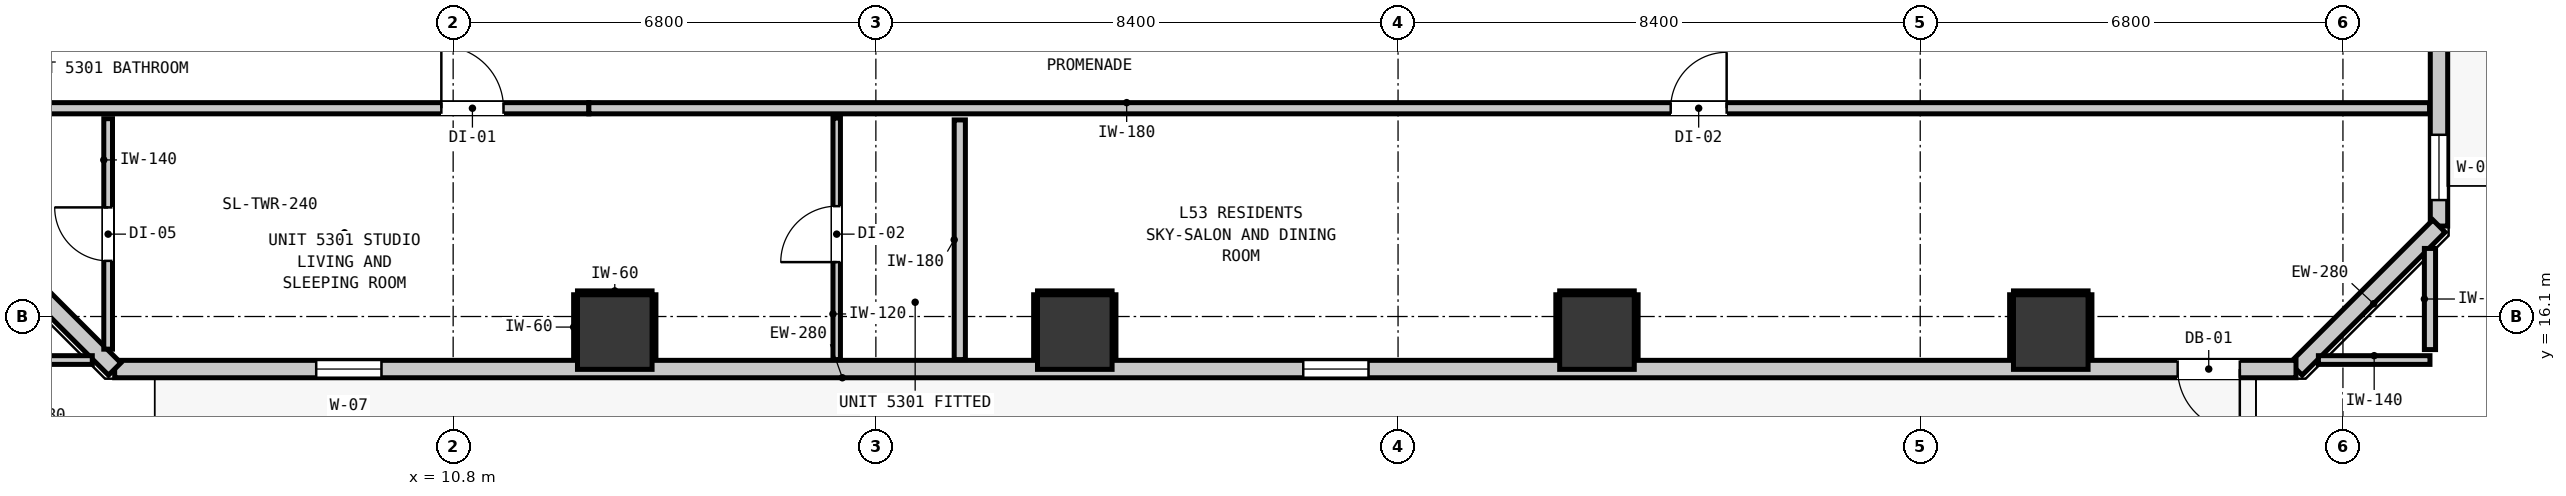
"""IFC4 building model, lengths in metres.
Left out: names, types, materials, properties, quantities, classifications, styles, units other than length and angle.
Written with IfcOpenShell. Run it as: python <this file> out.ifc"""

import sys

from ifc_helpers import new_model, si_unit, direction, frame, frame_2d, origin, origin_2d, place, context, subcontext, project, spatial, rectangle, extrude, element, fill, save


model = new_model("IFC4")
c1 = context("Model", 3, precision=1e-05, world=origin(), true_north=direction((0.0, 1.0)))
c2 = subcontext(c1, "Body", "Model", "MODEL_VIEW")
j1 = project(units=[si_unit("LENGTHUNIT", "METRE"), si_unit("PLANEANGLEUNIT", "RADIAN")], contexts=[c1])
p1 = place(None, origin())
s1 = spatial("IfcSite", under=j1, at=p1, CompositionType="ELEMENT")
p2 = place(p1, origin())
s2 = spatial("IfcBuilding", under=s1, at=p2, CompositionType="ELEMENT")
p3 = place(p2, frame((0.0, 0.0, 183.52)))
s3 = spatial("IfcBuildingStorey", under=s2, at=p3, CompositionType="ELEMENT", Elevation=183.52)
for number, where, z_axis, x_axis in (
    (1, (13.4, 15.85, 0.0), (0.0, 0.0, 1.0), (1.0, 0.0, 0.0)),
    (2, (20.8, 15.85, 0.0), (0.0, 0.0, 1.0), (1.0, 0.0, 0.0)),
    (3, (29.2, 15.85, 0.0), (0.0, 0.0, 1.0), (1.0, 0.0, 0.0)),
    (4, (36.5, 15.85, 0.0), (0.0, 0.0, 1.0), (1.0, 0.0, 0.0)),
):
    element("IfcColumn", number, at=place(p3, frame(where, z_axis=z_axis, x_axis=x_axis)), inside=s3, PredefinedType="COLUMN", context=c2, shape_type="SweptSolid", body=[
        extrude(rectangle(XDim=1.2, YDim=1.2, at=origin_2d()), origin(), (0.0, 0.0, 1.0), 3.32),
    ])
p4 = place(p3, frame((42.745, 49.845, 0.0), z_axis=(0.0, 0.0, 1.0), x_axis=(0.0, -1.0, 0.0)))
e5 = element("IfcWall", 5, at=p4, inside=s3, PredefinedType="STANDARD", context=c2, shape_type="SweptSolid", body=[
    extrude(rectangle(XDim=32.29, YDim=0.28, at=frame_2d((16.145, 0.0))), origin(), (0.0, 0.0, 1.0), 3.08),
])
p5 = place(p4, frame((0.904, 0.0, 0.0)))
e6 = element("IfcOpeningElement", 6, at=p5, cuts=e5, PredefinedType="OPENING", context=c2, shape_type="SweptSolid", body=[
    extrude(rectangle(XDim=1.0, YDim=2.15, at=frame_2d((0.5, 1.075))), frame((0.0, 0.15, 0.0), z_axis=(0.0, -1.0, 0.0), x_axis=(1.0, 0.0, 0.0)), (0.0, 0.0, 1.0), 0.3),
])
p6 = place(p4, frame((30.822, 0.0, 0.85)))
e7 = element("IfcOpeningElement", 7, at=p6, cuts=e5, PredefinedType="OPENING", context=c2, shape_type="SweptSolid", body=[
    extrude(rectangle(XDim=1.05, YDim=1.65, at=frame_2d((0.525, 0.825))), frame((0.0, 0.15, 0.0), z_axis=(0.0, -1.0, 0.0), x_axis=(1.0, 0.0, 0.0)), (0.0, 0.0, 1.0), 0.3),
])
p7 = place(p4, frame((4.424, 0.0, 0.85)))
e8 = element("IfcOpeningElement", 8, at=p7, cuts=e5, PredefinedType="OPENING", context=c2, shape_type="SweptSolid", body=[
    extrude(rectangle(XDim=1.05, YDim=1.65, at=frame_2d((0.525, 0.825))), frame((0.0, 0.15, 0.0), z_axis=(0.0, -1.0, 0.0), x_axis=(1.0, 0.0, 0.0)), (0.0, 0.0, 1.0), 0.3),
])
p8 = place(p4, frame((24.724, 0.0, 0.85)))
e9 = element("IfcOpeningElement", 9, at=p8, cuts=e5, PredefinedType="OPENING", context=c2, shape_type="SweptSolid", body=[
    extrude(rectangle(XDim=1.05, YDim=1.65, at=frame_2d((0.525, 0.825))), frame((0.0, 0.15, 0.0), z_axis=(0.0, -1.0, 0.0), x_axis=(1.0, 0.0, 0.0)), (0.0, 0.0, 1.0), 0.3),
])
p9 = place(p3, frame((42.745, 17.555, 0.0), z_axis=(0.0, 0.0, 1.0), x_axis=(-0.707106781187, -0.707106781187, 0.0)))
e10 = element("IfcWall", 10, at=p9, inside=s3, PredefinedType="STANDARD", context=c2, shape_type="SweptSolid", body=[
    extrude(rectangle(XDim=3.253, YDim=0.28, at=frame_2d((1.626, 0.0))), origin(), (0.0, 0.0, 1.0), 3.08),
])
p10 = place(p3, frame((40.445, 15.255, 0.0), z_axis=(0.0, 0.0, 1.0), x_axis=(-1.0, 0.0, 0.0)))
e11 = element("IfcWall", 11, at=p10, inside=s3, PredefinedType="STANDARD", context=c2, shape_type="SweptSolid", body=[
    extrude(rectangle(XDim=35.09, YDim=0.28, at=frame_2d((17.545, 0.0))), origin(), (0.0, 0.0, 1.0), 3.08),
])
p11 = place(p10, frame((0.904, 0.0, 0.0)))
e12 = element("IfcOpeningElement", 12, at=p11, cuts=e11, PredefinedType="OPENING", context=c2, shape_type="SweptSolid", body=[
    extrude(rectangle(XDim=1.0, YDim=2.15, at=frame_2d((0.5, 1.075))), frame((0.0, 0.15, 0.0), z_axis=(0.0, -1.0, 0.0), x_axis=(1.0, 0.0, 0.0)), (0.0, 0.0, 1.0), 0.3),
])
p12 = place(p10, frame((30.798, 0.0, 0.85)))
e13 = element("IfcOpeningElement", 13, at=p12, cuts=e11, PredefinedType="OPENING", context=c2, shape_type="SweptSolid", body=[
    extrude(rectangle(XDim=1.05, YDim=1.65, at=frame_2d((0.525, 0.825))), frame((0.0, 0.15, 0.0), z_axis=(0.0, -1.0, 0.0), x_axis=(1.0, 0.0, 0.0)), (0.0, 0.0, 1.0), 0.3),
])
p13 = place(p10, frame((14.92, 0.0, 0.85)))
e14 = element("IfcOpeningElement", 14, at=p13, cuts=e11, PredefinedType="OPENING", context=c2, shape_type="SweptSolid", body=[
    extrude(rectangle(XDim=1.05, YDim=1.65, at=frame_2d((0.525, 0.825))), frame((0.0, 0.15, 0.0), z_axis=(0.0, -1.0, 0.0), x_axis=(1.0, 0.0, 0.0)), (0.0, 0.0, 1.0), 0.3),
])
p14 = place(p3, frame((5.355, 15.255, 0.0), z_axis=(0.0, 0.0, 1.0), x_axis=(-0.707106781187, 0.707106781187, 0.0)))
e15 = element("IfcWall", 15, at=p14, inside=s3, PredefinedType="STANDARD", context=c2, shape_type="SweptSolid", body=[
    extrude(rectangle(XDim=3.253, YDim=0.28, at=frame_2d((1.626, 0.0))), origin(), (0.0, 0.0, 1.0), 3.08),
])
p15 = place(p3, frame((4.067, 19.45, 0.0), z_axis=(0.0, 0.0, 1.0), x_axis=(1.0, 0.0, 0.0)))
e16 = element("IfcWall", 16, at=p15, inside=s3, PredefinedType="PARTITIONING", context=c2, shape_type="SweptSolid", body=[
    extrude(rectangle(XDim=8.916, YDim=0.18, at=frame_2d((4.458, 0.0))), origin(), (0.0, 0.0, 1.0), 2.565),
])
p16 = place(p15, frame((6.543, 0.0, 0.0)))
e17 = element("IfcOpeningElement", 17, at=p16, cuts=e16, PredefinedType="OPENING", context=c2, shape_type="SweptSolid", body=[
    extrude(rectangle(XDim=1.0, YDim=2.15, at=frame_2d((0.5, 1.075))), frame((0.0, 0.1, 0.0), z_axis=(0.0, -1.0, 0.0), x_axis=(1.0, 0.0, 0.0)), (0.0, 0.0, 1.0), 0.2),
])
p17 = place(p3, frame((12.983, 19.45, 0.0), z_axis=(0.0, 0.0, 1.0), x_axis=(1.0, 0.0, 0.0)))
e18 = element("IfcWall", 18, at=p17, inside=s3, PredefinedType="PARTITIONING", context=c2, shape_type="SweptSolid", body=[
    extrude(rectangle(XDim=29.61, YDim=0.18, at=frame_2d((14.805, 0.0))), origin(), (0.0, 0.0, 1.0), 3.08),
])
p18 = place(p17, frame((17.403, 0.0, 0.0)))
e19 = element("IfcOpeningElement", 19, at=p18, cuts=e18, PredefinedType="OPENING", context=c2, shape_type="SweptSolid", body=[
    extrude(rectangle(XDim=0.9, YDim=2.1, at=frame_2d((0.45, 1.05))), frame((0.0, 0.1, 0.0), z_axis=(0.0, -1.0, 0.0), x_axis=(1.0, 0.0, 0.0)), (0.0, 0.0, 1.0), 0.2),
])
for number, where, z_axis, x_axis in (
    (20, (3.2, 15.4, 0.0), (0.0, 0.0, 1.0), (1.0, 0.0, 0.0)),
    (21, (40.805, 15.4, 0.0), (0.0, 0.0, 1.0), (1.0, 0.0, 0.0)),
):
    element("IfcWall", number, at=place(p3, frame(where, z_axis=z_axis, x_axis=x_axis)), inside=s3, PredefinedType="PARTITIONING", context=c2, shape_type="SweptSolid", body=[
        extrude(rectangle(XDim=1.795, YDim=0.14, at=frame_2d((0.897, 0.0))), origin(), (0.0, 0.0, 1.0), 3.08),
    ])
p19 = place(p3, frame((18.95, 15.407, 0.0), z_axis=(0.0, 0.0, 1.0), x_axis=(0.0, 1.0, 0.0)))
e22 = element("IfcWall", 22, at=p19, inside=s3, PredefinedType="PARTITIONING", context=c2, shape_type="SweptSolid", body=[
    extrude(rectangle(XDim=3.855, YDim=0.18, at=frame_2d((1.927, 0.0))), origin(), (0.0, 0.0, 1.0), 3.08),
])
p20 = place(p3, frame((42.6, 15.568, 0.0), z_axis=(0.0, 0.0, 1.0), x_axis=(0.0, 1.0, 0.0)))
e23 = element("IfcWall", 23, at=p20, inside=s3, PredefinedType="PARTITIONING", context=c2, shape_type="SweptSolid", body=[
    extrude(rectangle(XDim=1.627, YDim=0.18, at=frame_2d((0.813, 0.0))), origin(), (0.0, 0.0, 1.0), 3.08),
])
p21 = place(p3, frame((5.25, 15.575, 0.0), z_axis=(0.0, 0.0, 1.0), x_axis=(0.0, 1.0, 0.0)))
e24 = element("IfcWall", 24, at=p21, inside=s3, PredefinedType="PARTITIONING", context=c2, shape_type="SweptSolid", body=[
    extrude(rectangle(XDim=3.707, YDim=0.14, at=frame_2d((1.854, 0.0))), origin(), (0.0, 0.0, 1.0), 3.08),
])
p22 = place(p21, frame((1.42, 0.0, 0.0)))
e25 = element("IfcOpeningElement", 25, at=p22, cuts=e24, PredefinedType="OPENING", context=c2, shape_type="SweptSolid", body=[
    extrude(rectangle(XDim=0.86, YDim=2.02, at=frame_2d((0.43, 1.01))), frame((0.0, 0.08, 0.0), z_axis=(0.0, -1.0, 0.0), x_axis=(1.0, 0.0, 0.0)), (0.0, 0.0, 1.0), 0.16),
])
p23 = place(p3, frame((16.97, 15.407, 0.0), z_axis=(0.0, 0.0, 1.0), x_axis=(0.0, 1.0, 0.0)))
e26 = element("IfcWall", 26, at=p23, inside=s3, PredefinedType="PARTITIONING", context=c2, shape_type="SweptSolid", body=[
    extrude(rectangle(XDim=3.885, YDim=0.12, at=frame_2d((1.942, 0.0))), origin(), (0.0, 0.0, 1.0), 3.08),
])
p24 = place(p23, frame((1.568, 0.0, 0.0)))
e27 = element("IfcOpeningElement", 27, at=p24, cuts=e26, PredefinedType="OPENING", context=c2, shape_type="SweptSolid", body=[
    extrude(rectangle(XDim=0.9, YDim=2.1, at=frame_2d((0.45, 1.05))), frame((0.0, 0.07, 0.0), z_axis=(0.0, -1.0, 0.0), x_axis=(1.0, 0.0, 0.0)), (0.0, 0.0, 1.0), 0.14),
])
p25 = place(p3, frame((12.8, 16.482, 0.0), z_axis=(0.0, 0.0, 1.0), x_axis=(1.0, 0.0, 0.0)))
e28 = element("IfcWall", 28, at=p25, inside=s3, PredefinedType="PARTITIONING", context=c2, shape_type="SweptSolid", body=[
    extrude(rectangle(XDim=1.2, YDim=0.06, at=frame_2d((0.6, 0.0))), origin(), (0.0, 0.0, 1.0), 1.45),
])
for number, where, z_axis, x_axis in (
    (29, (12.768, 15.41, 0.0), (0.0, 0.0, 1.0), (0.0, 1.0, 0.0)),
    (30, (14.032, 15.41, 0.0), (0.0, 0.0, 1.0), (0.0, 1.0, 0.0)),
):
    element("IfcWall", number, at=place(p3, frame(where, z_axis=z_axis, x_axis=x_axis)), inside=s3, PredefinedType="PARTITIONING", context=c2, shape_type="SweptSolid", body=[
        extrude(rectangle(XDim=1.04, YDim=0.06, at=frame_2d((0.52, 0.0))), origin(), (0.0, 0.0, 1.0), 1.45),
    ])
p26 = place(p3, frame((20.2, 16.482, 0.0), z_axis=(0.0, 0.0, 1.0), x_axis=(1.0, 0.0, 0.0)))
e31 = element("IfcWall", 31, at=p26, inside=s3, PredefinedType="PARTITIONING", context=c2, shape_type="SweptSolid", body=[
    extrude(rectangle(XDim=1.2, YDim=0.06, at=frame_2d((0.6, 0.0))), origin(), (0.0, 0.0, 1.0), 1.45),
])
for number, where, z_axis, x_axis in (
    (32, (20.168, 15.41, 0.0), (0.0, 0.0, 1.0), (0.0, 1.0, 0.0)),
    (33, (21.432, 15.41, 0.0), (0.0, 0.0, 1.0), (0.0, 1.0, 0.0)),
):
    element("IfcWall", number, at=place(p3, frame(where, z_axis=z_axis, x_axis=x_axis)), inside=s3, PredefinedType="PARTITIONING", context=c2, shape_type="SweptSolid", body=[
        extrude(rectangle(XDim=1.04, YDim=0.06, at=frame_2d((0.52, 0.0))), origin(), (0.0, 0.0, 1.0), 1.45),
    ])
p27 = place(p3, frame((28.6, 16.482, 0.0), z_axis=(0.0, 0.0, 1.0), x_axis=(1.0, 0.0, 0.0)))
e34 = element("IfcWall", 34, at=p27, inside=s3, PredefinedType="PARTITIONING", context=c2, shape_type="SweptSolid", body=[
    extrude(rectangle(XDim=1.2, YDim=0.06, at=frame_2d((0.6, 0.0))), origin(), (0.0, 0.0, 1.0), 1.45),
])
for number, where, z_axis, x_axis in (
    (35, (28.568, 15.41, 0.0), (0.0, 0.0, 1.0), (0.0, 1.0, 0.0)),
    (36, (29.832, 15.41, 0.0), (0.0, 0.0, 1.0), (0.0, 1.0, 0.0)),
):
    element("IfcWall", number, at=place(p3, frame(where, z_axis=z_axis, x_axis=x_axis)), inside=s3, PredefinedType="PARTITIONING", context=c2, shape_type="SweptSolid", body=[
        extrude(rectangle(XDim=1.04, YDim=0.06, at=frame_2d((0.52, 0.0))), origin(), (0.0, 0.0, 1.0), 1.45),
    ])
p28 = place(p3, frame((35.9, 16.482, 0.0), z_axis=(0.0, 0.0, 1.0), x_axis=(1.0, 0.0, 0.0)))
e37 = element("IfcWall", 37, at=p28, inside=s3, PredefinedType="PARTITIONING", context=c2, shape_type="SweptSolid", body=[
    extrude(rectangle(XDim=1.2, YDim=0.06, at=frame_2d((0.6, 0.0))), origin(), (0.0, 0.0, 1.0), 1.45),
])
for number, where, z_axis, x_axis in (
    (38, (35.868, 15.41, 0.0), (0.0, 0.0, 1.0), (0.0, 1.0, 0.0)),
    (39, (37.132, 15.41, 0.0), (0.0, 0.0, 1.0), (0.0, 1.0, 0.0)),
):
    element("IfcWall", number, at=place(p3, frame(where, z_axis=z_axis, x_axis=x_axis)), inside=s3, PredefinedType="PARTITIONING", context=c2, shape_type="SweptSolid", body=[
        extrude(rectangle(XDim=1.04, YDim=0.06, at=frame_2d((0.52, 0.0))), origin(), (0.0, 0.0, 1.0), 1.45),
    ])
p29 = place(p11, origin())
e40 = element("IfcDoor", 40, at=p29, inside=s3, OperationType="SINGLE_SWING_LEFT", PredefinedType="DOOR", context=c2, shape_type="SweptSolid", body=[
    extrude(rectangle(XDim=1.0, YDim=2.15, at=frame_2d((0.5, 1.075))), frame((0.0, 0.025, 0.0), z_axis=(0.0, -1.0, 0.0), x_axis=(1.0, 0.0, 0.0)), (0.0, 0.0, 1.0), 0.05),
])
fill(e12, e40)
p30 = place(p6, origin())
e41 = element("IfcWindow", 41, at=p30, inside=s3, PartitioningType="SINGLE_PANEL", PredefinedType="WINDOW", context=c2, shape_type="SweptSolid", body=[
    extrude(rectangle(XDim=1.05, YDim=1.65, at=frame_2d((0.525, 0.825))), frame((0.0, 0.03, 0.0), z_axis=(0.0, -1.0, 0.0), x_axis=(1.0, 0.0, 0.0)), (0.0, 0.0, 1.0), 0.06),
])
fill(e7, e41)
p31 = place(p12, origin())
e42 = element("IfcWindow", 42, at=p31, inside=s3, PartitioningType="SINGLE_PANEL", PredefinedType="WINDOW", context=c2, shape_type="SweptSolid", body=[
    extrude(rectangle(XDim=1.05, YDim=1.65, at=frame_2d((0.525, 0.825))), frame((0.0, 0.03, 0.0), z_axis=(0.0, -1.0, 0.0), x_axis=(1.0, 0.0, 0.0)), (0.0, 0.0, 1.0), 0.06),
])
fill(e13, e42)
p32 = place(p13, origin())
e43 = element("IfcWindow", 43, at=p32, inside=s3, PartitioningType="SINGLE_PANEL", PredefinedType="WINDOW", context=c2, shape_type="SweptSolid", body=[
    extrude(rectangle(XDim=1.05, YDim=1.65, at=frame_2d((0.525, 0.825))), frame((0.0, 0.03, 0.0), z_axis=(0.0, -1.0, 0.0), x_axis=(1.0, 0.0, 0.0)), (0.0, 0.0, 1.0), 0.06),
])
fill(e14, e43)
p33 = place(p16, origin())
e44 = element("IfcDoor", 44, at=p33, inside=s3, OperationType="SINGLE_SWING_LEFT", PredefinedType="DOOR", context=c2, shape_type="SweptSolid", body=[
    extrude(rectangle(XDim=1.0, YDim=2.15, at=frame_2d((0.5, 1.075))), frame((0.0, 0.025, 0.0), z_axis=(0.0, -1.0, 0.0), x_axis=(1.0, 0.0, 0.0)), (0.0, 0.0, 1.0), 0.05),
])
fill(e17, e44)
p34 = place(p22, origin())
e45 = element("IfcDoor", 45, at=p34, inside=s3, OperationType="SINGLE_SWING_RIGHT", PredefinedType="DOOR", context=c2, shape_type="SweptSolid", body=[
    extrude(rectangle(XDim=0.86, YDim=2.02, at=frame_2d((0.43, 1.01))), frame((0.0, 0.025, 0.0), z_axis=(0.0, -1.0, 0.0), x_axis=(1.0, 0.0, 0.0)), (0.0, 0.0, 1.0), 0.05),
])
fill(e25, e45)
p35 = place(p24, origin())
e46 = element("IfcDoor", 46, at=p35, inside=s3, OperationType="SINGLE_SWING_LEFT", PredefinedType="DOOR", context=c2, shape_type="SweptSolid", body=[
    extrude(rectangle(XDim=0.9, YDim=2.1, at=frame_2d((0.45, 1.05))), frame((0.0, 0.025, 0.0), z_axis=(0.0, -1.0, 0.0), x_axis=(1.0, 0.0, 0.0)), (0.0, 0.0, 1.0), 0.05),
])
fill(e27, e46)
p36 = place(p18, origin())
e47 = element("IfcDoor", 47, at=p36, inside=s3, OperationType="SINGLE_SWING_RIGHT", PredefinedType="DOOR", context=c2, shape_type="SweptSolid", body=[
    extrude(rectangle(XDim=0.9, YDim=2.1, at=frame_2d((0.45, 1.05))), frame((0.0, 0.025, 0.0), z_axis=(0.0, -1.0, 0.0), x_axis=(1.0, 0.0, 0.0)), (0.0, 0.0, 1.0), 0.05),
])
fill(e19, e47)
save(model, sys.argv[1])
